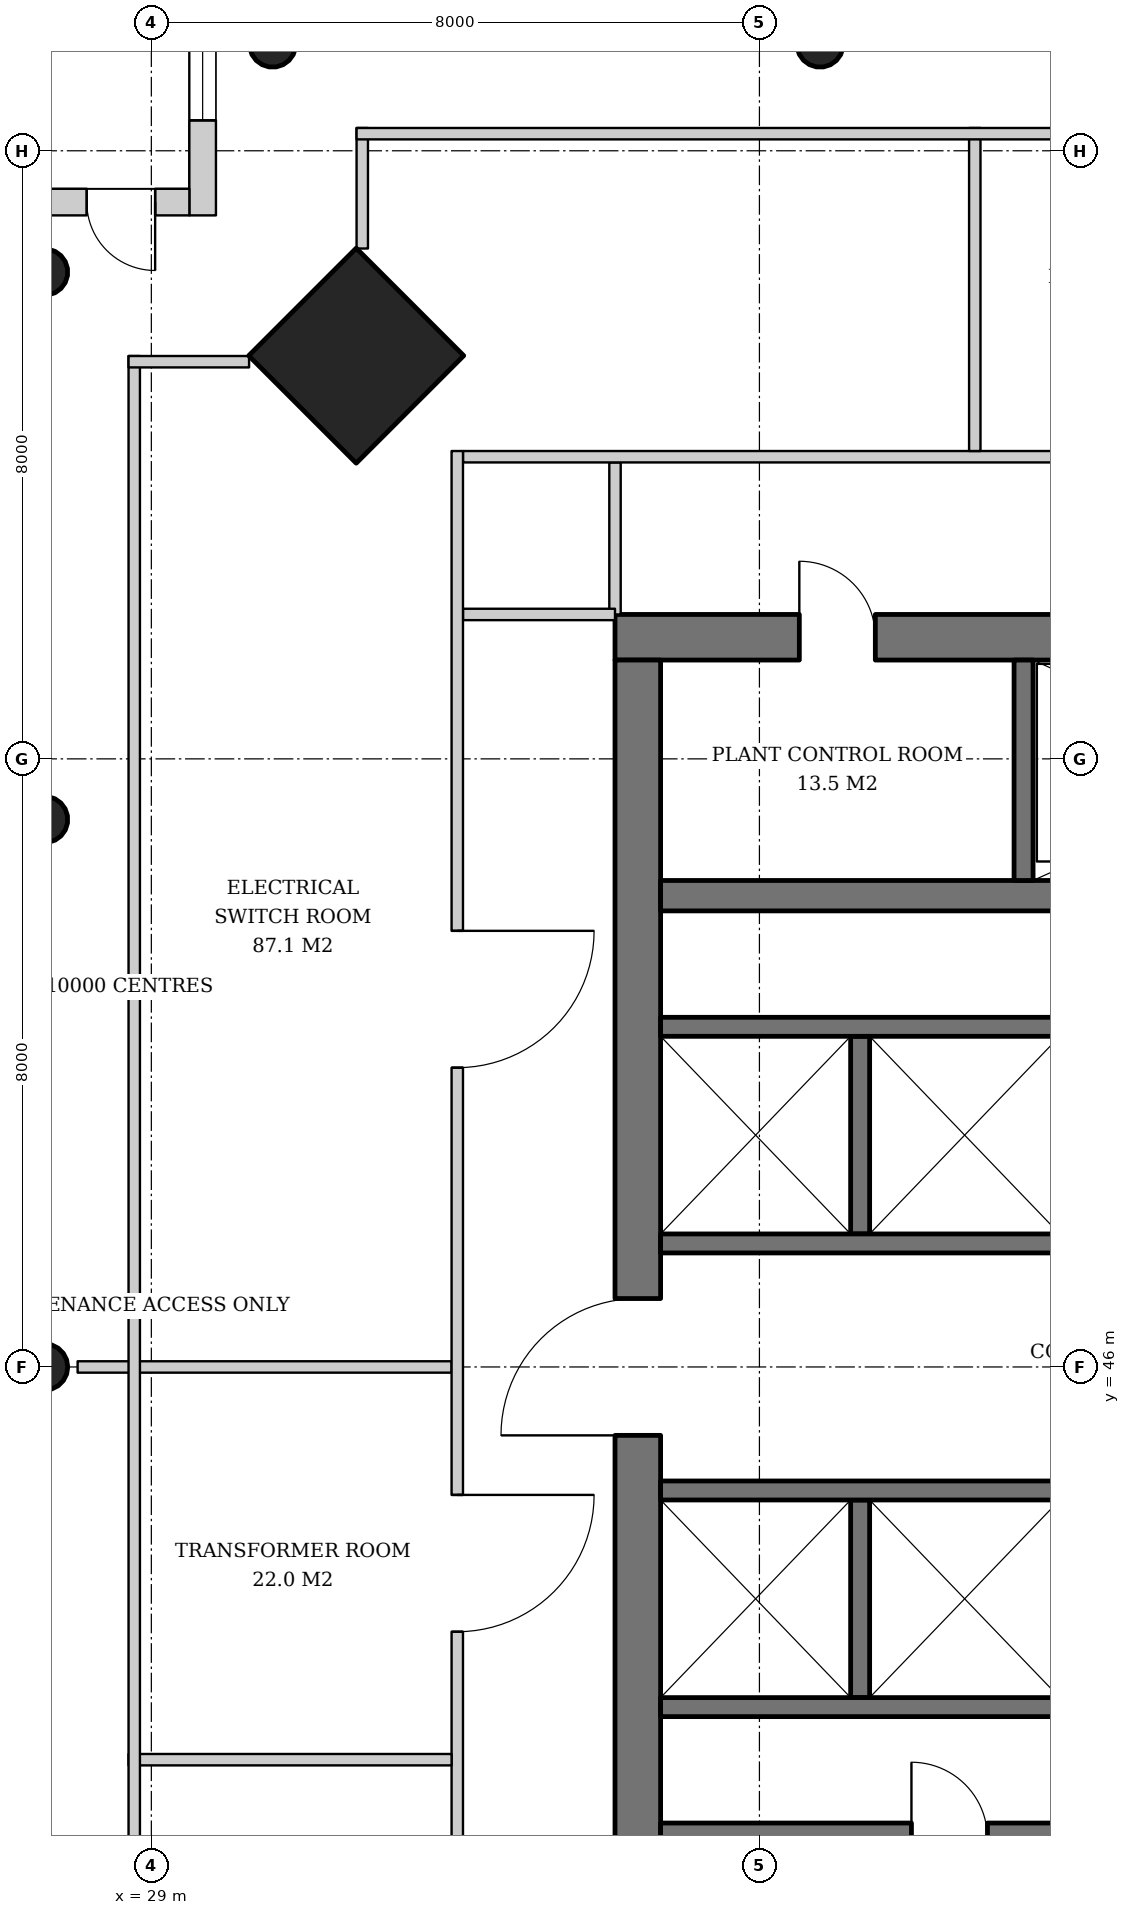
"""IFC4 building model, lengths in metres.
Left out: names, types, materials, properties, quantities, classifications, styles, units other than length and angle.
Written with IfcOpenShell. Run it as: python <this file> out.ifc"""

import sys

from ifc_helpers import new_model, si_unit, direction, frame, frame_2d, origin, origin_2d, place, context, subcontext, project, spatial, rectangle, hollow_circle, extrude, element, fill, save


model = new_model("IFC4")
c1 = context("Model", 3, precision=1e-05, world=origin(), true_north=direction((0.0, 1.0)))
c2 = subcontext(c1, "Body", "Model", "MODEL_VIEW")
j1 = project(units=[si_unit("LENGTHUNIT", "METRE"), si_unit("PLANEANGLEUNIT", "RADIAN")], contexts=[c1])
p1 = place(None, origin())
s1 = spatial("IfcSite", under=j1, at=p1, CompositionType="ELEMENT")
p2 = place(p1, origin())
s2 = spatial("IfcBuilding", under=s1, at=p2, CompositionType="ELEMENT")
p3 = place(p2, frame((0.0, 0.0, 226.2)))
s3 = spatial("IfcBuildingStorey", under=s2, at=p3, CompositionType="ELEMENT", Elevation=226.2)
p4 = place(p3, frame((31.657, 59.343, 0.0), z_axis=(0.031898107953, -0.031898107953, 0.998981992539), x_axis=(0.707106781187, 0.707106781187, 0.0)))
e1 = element("IfcColumn", 1, at=p4, inside=s3, PredefinedType="COLUMN", context=c2, shape_type="SweptSolid", body=[
    extrude(rectangle(XDim=2.0, YDim=2.0, at=origin_2d()), origin(), (0.0, 0.0, 1.0), 3.804),
])
p5 = place(p3, frame((30.557, 63.443, 0.0), z_axis=(0.031898107953, -0.031898107953, 0.998981992539), x_axis=(0.707106781187, 0.707106781187, 0.0)))
e2 = element("IfcColumn", 2, at=p5, inside=s3, PredefinedType="COLUMN", context=c2, shape_type="SweptSolid", body=[
    extrude(hollow_circle(Radius=0.305, WallThickness=0.025, at=origin_2d()), origin(), (0.0, 0.0, 1.0), 3.804),
])
p6 = place(p3, frame((37.779, 63.443, 0.0), z_axis=(0.015987237665, -0.031910269556, 0.999362868496), x_axis=(0.894067115991, 0.447933021895, 0.0)))
e3 = element("IfcColumn", 3, at=p6, inside=s3, PredefinedType="COLUMN", context=c2, shape_type="SweptSolid", body=[
    extrude(hollow_circle(Radius=0.305, WallThickness=0.025, at=origin_2d()), origin(), (0.0, 0.0, 1.0), 3.802),
])
p7 = place(p3, frame((27.557, 60.443, 0.0), z_axis=(0.031898107953, -0.031898107953, 0.998981992539), x_axis=(0.707106781187, 0.707106781187, 0.0)))
e4 = element("IfcColumn", 4, at=p7, inside=s3, PredefinedType="COLUMN", context=c2, shape_type="SweptSolid", body=[
    extrude(hollow_circle(Radius=0.305, WallThickness=0.025, at=origin_2d()), origin(), (0.0, 0.0, 1.0), 3.804),
])
p8 = place(p3, frame((27.557, 53.221, 0.0), z_axis=(0.031910269556, -0.015987237665, 0.999362868496), x_axis=(0.447933021895, 0.894067115991, 0.0)))
e5 = element("IfcColumn", 5, at=p8, inside=s3, PredefinedType="COLUMN", context=c2, shape_type="SweptSolid", body=[
    extrude(hollow_circle(Radius=0.305, WallThickness=0.025, at=origin_2d()), origin(), (0.0, 0.0, 1.0), 3.802),
])
p9 = place(p3, frame((27.557, 46.0, 0.0), z_axis=(0.031914348339, 0.0, 0.999490607445), x_axis=(0.0, 1.0, 0.0)))
e6 = element("IfcColumn", 6, at=p9, inside=s3, PredefinedType="COLUMN", context=c2, shape_type="SweptSolid", body=[
    extrude(hollow_circle(Radius=0.305, WallThickness=0.025, at=origin_2d()), origin(), (0.0, 0.0, 1.0), 3.802),
])
p10 = place(p3, frame((35.1, 55.6, 0.0), z_axis=(0.0, 0.0, 1.0), x_axis=(1.0, 0.0, 0.0)))
e7 = element("IfcWall", 7, at=p10, inside=s3, PredefinedType="SHEAR", context=c2, shape_type="SweptSolid", body=[
    extrude(rectangle(XDim=19.8, YDim=0.6, at=frame_2d((9.9, 0.0))), origin(), (0.0, 0.0, 1.0), 3.8),
])
p11 = place(p10, frame((14.54, 0.0, 0.0)))
e8 = element("IfcOpeningElement", 8, at=p11, cuts=e7, PredefinedType="OPENING", context=c2, shape_type="SweptSolid", body=[
    extrude(rectangle(XDim=1.0, YDim=2.1, at=frame_2d((0.5, 1.05))), frame((0.0, 0.31, 0.0), z_axis=(0.0, -1.0, 0.0), x_axis=(1.0, 0.0, 0.0)), (0.0, 0.0, 1.0), 0.62),
])
p12 = place(p10, frame((2.425, 0.0, 0.0)))
e9 = element("IfcOpeningElement", 9, at=p12, cuts=e7, PredefinedType="OPENING", context=c2, shape_type="SweptSolid", body=[
    extrude(rectangle(XDim=1.0, YDim=2.1, at=frame_2d((0.5, 1.05))), frame((0.0, 0.31, 0.0), z_axis=(0.0, -1.0, 0.0), x_axis=(1.0, 0.0, 0.0)), (0.0, 0.0, 1.0), 0.62),
])
p13 = place(p3, frame((35.4, 36.7, 0.0), z_axis=(0.0, 0.0, 1.0), x_axis=(0.0, 1.0, 0.0)))
e10 = element("IfcWall", 10, at=p13, inside=s3, PredefinedType="SHEAR", context=c2, shape_type="SweptSolid", body=[
    extrude(rectangle(XDim=18.6, YDim=0.6, at=frame_2d((9.3, 0.0))), origin(), (0.0, 0.0, 1.0), 3.8),
])
p14 = place(p13, frame((8.4, 0.0, 0.0)))
e11 = element("IfcOpeningElement", 11, at=p14, cuts=e10, PredefinedType="OPENING", context=c2, shape_type="SweptSolid", body=[
    extrude(rectangle(XDim=1.8, YDim=2.4, at=frame_2d((0.9, 1.2))), frame((0.0, 0.31, 0.0), z_axis=(0.0, -1.0, 0.0), x_axis=(1.0, 0.0, 0.0)), (0.0, 0.0, 1.0), 0.62),
])
p15 = place(p3, frame((35.7, 39.8, 0.0), z_axis=(0.0, 0.0, 1.0), x_axis=(1.0, 0.0, 0.0)))
e12 = element("IfcWall", 12, at=p15, inside=s3, PredefinedType="SHEAR", context=c2, shape_type="SweptSolid", body=[
    extrude(rectangle(XDim=18.6, YDim=0.4, at=frame_2d((9.3, 0.0))), origin(), (0.0, 0.0, 1.0), 3.8),
])
p16 = place(p15, frame((3.3, 0.0, 0.0)))
e13 = element("IfcOpeningElement", 13, at=p16, cuts=e12, PredefinedType="OPENING", context=c2, shape_type="SweptSolid", body=[
    extrude(rectangle(XDim=1.0, YDim=2.1, at=frame_2d((0.5, 1.05))), frame((0.0, 0.21, 0.0), z_axis=(0.0, -1.0, 0.0), x_axis=(1.0, 0.0, 0.0)), (0.0, 0.0, 1.0), 0.42),
])
p17 = place(p3, frame((35.7, 52.2, 0.0), z_axis=(0.0, 0.0, 1.0), x_axis=(1.0, 0.0, 0.0)))
e14 = element("IfcWall", 14, at=p17, inside=s3, PredefinedType="SHEAR", context=c2, shape_type="SweptSolid", body=[
    extrude(rectangle(XDim=18.6, YDim=0.4, at=frame_2d((9.3, 0.0))), origin(), (0.0, 0.0, 1.0), 3.8),
])
p18 = place(p17, frame((11.33, 0.0, 0.0)))
e15 = element("IfcOpeningElement", 15, at=p18, cuts=e14, PredefinedType="OPENING", context=c2, shape_type="SweptSolid", body=[
    extrude(rectangle(XDim=1.0, YDim=2.1, at=frame_2d((0.5, 1.05))), frame((0.0, 0.21, 0.0), z_axis=(0.0, -1.0, 0.0), x_axis=(1.0, 0.0, 0.0)), (0.0, 0.0, 1.0), 0.42),
])
p19 = place(p3, frame((29.675, 64.5, 0.0), z_axis=(0.0, 0.0, 1.0), x_axis=(0.0, -1.0, 0.0)))
e16 = element("IfcWall", 16, at=p19, inside=s3, PredefinedType="SOLIDWALL", context=c2, shape_type="SweptSolid", body=[
    extrude(rectangle(XDim=3.35, YDim=0.35, at=frame_2d((1.675, 0.0))), origin(), (0.0, 0.0, 1.0), 3.52),
])
p20 = place(p19, frame((0.9, 0.0, 0.6)))
e17 = element("IfcOpeningElement", 17, at=p20, cuts=e16, PredefinedType="OPENING", context=c2, shape_type="SweptSolid", body=[
    extrude(rectangle(XDim=1.2, YDim=2.55, at=frame_2d((0.6, 1.275))), frame((0.0, 0.185, 0.0), z_axis=(0.0, -1.0, 0.0), x_axis=(1.0, 0.0, 0.0)), (0.0, 0.0, 1.0), 0.37),
])
p21 = place(p3, frame((29.5, 61.325, 0.0), z_axis=(0.0, 0.0, 1.0), x_axis=(-1.0, 0.0, 0.0)))
e18 = element("IfcWall", 18, at=p21, inside=s3, PredefinedType="SOLIDWALL", context=c2, shape_type="SweptSolid", body=[
    extrude(rectangle(XDim=3.0, YDim=0.35, at=frame_2d((1.5, 0.0))), origin(), (0.0, 0.0, 1.0), 3.52),
])
p22 = place(p21, frame((0.45, 0.0, 0.0)))
e19 = element("IfcOpeningElement", 19, at=p22, cuts=e18, PredefinedType="OPENING", context=c2, shape_type="SweptSolid", body=[
    extrude(rectangle(XDim=0.9, YDim=2.1, at=frame_2d((0.45, 1.05))), frame((0.0, 0.185, 0.0), z_axis=(0.0, -1.0, 0.0), x_axis=(1.0, 0.0, 0.0)), (0.0, 0.0, 1.0), 0.37),
])
p23 = place(p3, frame((40.475, 52.4, 0.0), z_axis=(0.0, 0.0, 1.0), x_axis=(0.0, 1.0, 0.0)))
e20 = element("IfcWall", 20, at=p23, inside=s3, PredefinedType="SHEAR", context=c2, shape_type="SweptSolid", body=[
    extrude(rectangle(XDim=2.9, YDim=0.25, at=frame_2d((1.45, 0.0))), origin(), (0.0, 0.0, 1.0), 3.8),
])
p24 = place(p3, frame((38.325, 47.75, 0.0), z_axis=(0.0, 0.0, 1.0), x_axis=(0.0, 1.0, 0.0)))
e21 = element("IfcWall", 21, at=p24, inside=s3, PredefinedType="SHEAR", context=c2, shape_type="SweptSolid", body=[
    extrude(rectangle(XDim=2.6, YDim=0.25, at=frame_2d((1.3, 0.0))), origin(), (0.0, 0.0, 1.0), 3.8),
])
p25 = place(p3, frame((35.7, 50.475, 0.0), z_axis=(0.0, 0.0, 1.0), x_axis=(1.0, 0.0, 0.0)))
e22 = element("IfcWall", 22, at=p25, inside=s3, PredefinedType="SHEAR", context=c2, shape_type="SweptSolid", body=[
    extrude(rectangle(XDim=11.0, YDim=0.25, at=frame_2d((5.5, 0.0))), origin(), (0.0, 0.0, 1.0), 3.8),
])
p26 = place(p3, frame((35.7, 47.625, 0.0), z_axis=(0.0, 0.0, 1.0), x_axis=(1.0, 0.0, 0.0)))
e23 = element("IfcWall", 23, at=p26, inside=s3, PredefinedType="SHEAR", context=c2, shape_type="SweptSolid", body=[
    extrude(rectangle(XDim=12.83, YDim=0.25, at=frame_2d((6.415, 0.0))), origin(), (0.0, 0.0, 1.0), 3.8),
])
p27 = place(p26, frame((9.0, 0.0, 0.0)))
e24 = element("IfcOpeningElement", 24, at=p27, cuts=e23, PredefinedType="OPENING", context=c2, shape_type="SweptSolid", body=[
    extrude(rectangle(XDim=1.0, YDim=2.1, at=frame_2d((0.5, 1.05))), frame((0.0, 0.135, 0.0), z_axis=(0.0, -1.0, 0.0), x_axis=(1.0, 0.0, 0.0)), (0.0, 0.0, 1.0), 0.27),
])
p28 = place(p26, frame((11.415, 0.0, 0.0)))
e25 = element("IfcOpeningElement", 25, at=p28, cuts=e23, PredefinedType="OPENING", context=c2, shape_type="SweptSolid", body=[
    extrude(rectangle(XDim=1.0, YDim=2.1, at=frame_2d((0.5, 1.05))), frame((0.0, 0.135, 0.0), z_axis=(0.0, -1.0, 0.0), x_axis=(1.0, 0.0, 0.0)), (0.0, 0.0, 1.0), 0.27),
])
p29 = place(p3, frame((38.325, 44.25, 0.0), z_axis=(0.0, 0.0, 1.0), x_axis=(0.0, -1.0, 0.0)))
e26 = element("IfcWall", 26, at=p29, inside=s3, PredefinedType="SHEAR", context=c2, shape_type="SweptSolid", body=[
    extrude(rectangle(XDim=2.6, YDim=0.25, at=frame_2d((1.3, 0.0))), origin(), (0.0, 0.0, 1.0), 3.8),
])
p30 = place(p3, frame((35.7, 41.525, 0.0), z_axis=(0.0, 0.0, 1.0), x_axis=(1.0, 0.0, 0.0)))
e27 = element("IfcWall", 27, at=p30, inside=s3, PredefinedType="SHEAR", context=c2, shape_type="SweptSolid", body=[
    extrude(rectangle(XDim=11.0, YDim=0.25, at=frame_2d((5.5, 0.0))), origin(), (0.0, 0.0, 1.0), 3.8),
])
p31 = place(p3, frame((35.7, 44.375, 0.0), z_axis=(0.0, 0.0, 1.0), x_axis=(1.0, 0.0, 0.0)))
e28 = element("IfcWall", 28, at=p31, inside=s3, PredefinedType="SHEAR", context=c2, shape_type="SweptSolid", body=[
    extrude(rectangle(XDim=12.83, YDim=0.25, at=frame_2d((6.415, 0.0))), origin(), (0.0, 0.0, 1.0), 3.8),
])
p32 = place(p31, frame((9.0, 0.0, 0.0)))
e29 = element("IfcOpeningElement", 29, at=p32, cuts=e28, PredefinedType="OPENING", context=c2, shape_type="SweptSolid", body=[
    extrude(rectangle(XDim=1.0, YDim=2.1, at=frame_2d((0.5, 1.05))), frame((0.0, 0.135, 0.0), z_axis=(0.0, -1.0, 0.0), x_axis=(1.0, 0.0, 0.0)), (0.0, 0.0, 1.0), 0.27),
])
p33 = place(p31, frame((11.415, 0.0, 0.0)))
e30 = element("IfcOpeningElement", 30, at=p33, cuts=e28, PredefinedType="OPENING", context=c2, shape_type="SweptSolid", body=[
    extrude(rectangle(XDim=1.0, YDim=2.1, at=frame_2d((0.5, 1.05))), frame((0.0, 0.135, 0.0), z_axis=(0.0, -1.0, 0.0), x_axis=(1.0, 0.0, 0.0)), (0.0, 0.0, 1.0), 0.27),
])
p34 = place(p3, frame((35.1, 55.9, 0.0), z_axis=(0.0, 0.0, 1.0), x_axis=(0.0, 1.0, 0.0)))
e31 = element("IfcWall", 31, at=p34, inside=s3, PredefinedType="PARTITIONING", context=c2, shape_type="SweptSolid", body=[
    extrude(rectangle(XDim=2.0, YDim=0.15, at=frame_2d((1.0, 0.0))), origin(), (0.0, 0.0, 1.0), 3.52),
])
p35 = place(p3, frame((57.05, 57.975, 0.0), z_axis=(0.0, 0.0, 1.0), x_axis=(-1.0, 0.0, 0.0)))
e32 = element("IfcWall", 32, at=p35, inside=s3, PredefinedType="SOLIDWALL", context=c2, shape_type="SweptSolid", body=[
    extrude(rectangle(XDim=23.95, YDim=0.15, at=frame_2d((11.975, 0.0))), origin(), (0.0, 0.0, 1.0), 2.706),
])
p36 = place(p35, frame((2.85, 0.0, 0.0)))
e33 = element("IfcOpeningElement", 33, at=p36, cuts=e32, PredefinedType="OPENING", context=c2, shape_type="SweptSolid", body=[
    extrude(rectangle(XDim=1.0, YDim=2.1, at=frame_2d((0.5, 1.05))), frame((0.0, 0.085, 0.0), z_axis=(0.0, -1.0, 0.0), x_axis=(1.0, 0.0, 0.0)), (0.0, 0.0, 1.0), 0.17),
])
p37 = place(p35, frame((7.35, 0.0, 0.0)))
e34 = element("IfcOpeningElement", 34, at=p37, cuts=e32, PredefinedType="OPENING", context=c2, shape_type="SweptSolid", body=[
    extrude(rectangle(XDim=1.8, YDim=2.4, at=frame_2d((0.9, 1.2))), frame((0.0, 0.085, 0.0), z_axis=(0.0, -1.0, 0.0), x_axis=(1.0, 0.0, 0.0)), (0.0, 0.0, 1.0), 0.17),
])
p38 = place(p35, frame((13.733, 0.0, 0.0)))
e35 = element("IfcOpeningElement", 35, at=p38, cuts=e32, PredefinedType="OPENING", context=c2, shape_type="SweptSolid", body=[
    extrude(rectangle(XDim=1.8, YDim=2.4, at=frame_2d((0.9, 1.2))), frame((0.0, 0.085, 0.0), z_axis=(0.0, -1.0, 0.0), x_axis=(1.0, 0.0, 0.0)), (0.0, 0.0, 1.0), 0.17),
])
p39 = place(p3, frame((39.833, 58.05, 0.0), z_axis=(0.0, 0.0, 1.0), x_axis=(0.0, 1.0, 0.0)))
e36 = element("IfcWall", 36, at=p39, inside=s3, PredefinedType="SOLIDWALL", context=c2, shape_type="SweptSolid", body=[
    extrude(rectangle(XDim=4.25, YDim=0.15, at=frame_2d((2.125, 0.0))), origin(), (0.0, 0.0, 1.0), 3.52),
])
p40 = place(p3, frame((35.1, 55.9, 0.0), z_axis=(0.0, 0.0, 1.0), x_axis=(-1.0, 0.0, 0.0)))
e37 = element("IfcWall", 37, at=p40, inside=s3, PredefinedType="PARTITIONING", context=c2, shape_type="SweptSolid", body=[
    extrude(rectangle(XDim=2.0, YDim=0.15, at=frame_2d((1.0, 0.0))), origin(), (0.0, 0.0, 1.0), 3.52),
])
p41 = place(p3, frame((32.95, 46.0, 0.0), z_axis=(0.0, 0.0, 1.0), x_axis=(-1.0, 0.0, 0.0)))
e38 = element("IfcWall", 38, at=p41, inside=s3, PredefinedType="SOLIDWALL", context=c2, shape_type="SweptSolid", body=[
    extrude(rectangle(XDim=4.92, YDim=0.15, at=frame_2d((2.46, 0.0))), origin(), (0.0, 0.0, 1.0), 3.52),
])
p42 = place(p3, frame((33.025, 58.05, 0.0), z_axis=(0.0, 0.0, 1.0), x_axis=(0.0, -1.0, 0.0)))
e39 = element("IfcWall", 39, at=p42, inside=s3, PredefinedType="SOLIDWALL", context=c2, shape_type="SweptSolid", body=[
    extrude(rectangle(XDim=23.95, YDim=0.15, at=frame_2d((11.975, 0.0))), origin(), (0.0, 0.0, 1.0), 2.706),
])
p43 = place(p42, frame((6.312, 0.0, 0.0)))
e40 = element("IfcOpeningElement", 40, at=p43, cuts=e39, PredefinedType="OPENING", context=c2, shape_type="SweptSolid", body=[
    extrude(rectangle(XDim=1.8, YDim=2.4, at=frame_2d((0.9, 1.2))), frame((0.0, 0.085, 0.0), z_axis=(0.0, -1.0, 0.0), x_axis=(1.0, 0.0, 0.0)), (0.0, 0.0, 1.0), 0.17),
])
p44 = place(p42, frame((13.733, 0.0, 0.0)))
e41 = element("IfcOpeningElement", 41, at=p44, cuts=e39, PredefinedType="OPENING", context=c2, shape_type="SweptSolid", body=[
    extrude(rectangle(XDim=1.8, YDim=2.4, at=frame_2d((0.9, 1.2))), frame((0.0, 0.085, 0.0), z_axis=(0.0, -1.0, 0.0), x_axis=(1.0, 0.0, 0.0)), (0.0, 0.0, 1.0), 0.17),
])
p45 = place(p3, frame((32.95, 40.833, 0.0), z_axis=(0.0, 0.0, 1.0), x_axis=(-1.0, 0.0, 0.0)))
e42 = element("IfcWall", 42, at=p45, inside=s3, PredefinedType="SOLIDWALL", context=c2, shape_type="SweptSolid", body=[
    extrude(rectangle(XDim=4.25, YDim=0.15, at=frame_2d((2.125, 0.0))), origin(), (0.0, 0.0, 1.0), 3.52),
])
p46 = place(p3, frame((28.775, 32.7, 0.0), z_axis=(0.0, 0.0, 1.0), x_axis=(0.0, 1.0, 0.0)))
e43 = element("IfcWall", 43, at=p46, inside=s3, PredefinedType="PARTITIONING", context=c2, shape_type="SweptSolid", body=[
    extrude(rectangle(XDim=26.6, YDim=0.15, at=frame_2d((13.3, 0.0))), origin(), (0.0, 0.0, 1.0), 2.706),
])
for number, where, z_axis, x_axis in (
    (44, (28.7, 59.225, 0.0), (0.0, 0.0, 1.0), (1.0, 0.0, 0.0)),
    (45, (31.775, 60.714, 0.0), (0.0, 0.0, 1.0), (0.0, 1.0, 0.0)),
):
    element("IfcWall", number, at=place(p3, frame(where, z_axis=z_axis, x_axis=x_axis)), inside=s3, PredefinedType="PARTITIONING", context=c2, shape_type="SweptSolid", body=[
        extrude(rectangle(XDim=1.586, YDim=0.15, at=frame_2d((0.793, 0.0))), origin(), (0.0, 0.0, 1.0), 3.52),
    ])
p47 = place(p3, frame((31.7, 62.225, 0.0), z_axis=(0.0, 0.0, 1.0), x_axis=(1.0, 0.0, 0.0)))
e46 = element("IfcWall", 46, at=p47, inside=s3, PredefinedType="PARTITIONING", context=c2, shape_type="SweptSolid", body=[
    extrude(rectangle(XDim=26.6, YDim=0.15, at=frame_2d((13.3, 0.0))), origin(), (0.0, 0.0, 1.0), 2.706),
])
p48 = place(p20, origin())
e47 = element("IfcWindow", 47, at=p48, inside=s3, PartitioningType="SINGLE_PANEL", PredefinedType="USERDEFINED", context=c2, shape_type="SweptSolid", body=[
    extrude(rectangle(XDim=1.2, YDim=2.55, at=frame_2d((0.6, 1.275))), frame((0.0, 0.03, 0.0), z_axis=(0.0, -1.0, 0.0), x_axis=(1.0, 0.0, 0.0)), (0.0, 0.0, 1.0), 0.06),
])
fill(e17, e47)
p49 = place(p22, origin())
e48 = element("IfcDoor", 48, at=p49, inside=s3, OperationType="SINGLE_SWING_LEFT", PredefinedType="DOOR", context=c2, shape_type="SweptSolid", body=[
    extrude(rectangle(XDim=0.9, YDim=2.1, at=frame_2d((0.45, 1.05))), frame((0.0, 0.025, 0.0), z_axis=(0.0, -1.0, 0.0), x_axis=(1.0, 0.0, 0.0)), (0.0, 0.0, 1.0), 0.05),
])
fill(e19, e48)
p50 = place(p14, origin())
e49 = element("IfcDoor", 49, at=p50, inside=s3, OperationType="DOUBLE_DOOR_SINGLE_SWING", PredefinedType="DOOR", context=c2, shape_type="SweptSolid", body=[
    extrude(rectangle(XDim=1.8, YDim=2.4, at=frame_2d((0.9, 1.2))), frame((0.0, 0.025, 0.0), z_axis=(0.0, -1.0, 0.0), x_axis=(1.0, 0.0, 0.0)), (0.0, 0.0, 1.0), 0.05),
])
fill(e11, e49)
p51 = place(p12, origin())
e50 = element("IfcDoor", 50, at=p51, inside=s3, OperationType="SINGLE_SWING_LEFT", PredefinedType="DOOR", context=c2, shape_type="SweptSolid", body=[
    extrude(rectangle(XDim=1.0, YDim=2.1, at=frame_2d((0.5, 1.05))), frame((0.0, -0.24, 0.0), z_axis=(0.0, -1.0, 0.0), x_axis=(1.0, 0.0, 0.0)), (0.0, 0.0, 1.0), 0.05),
])
fill(e9, e50)
p52 = place(p43, origin())
e51 = element("IfcDoor", 51, at=p52, inside=s3, OperationType="DOUBLE_DOOR_SINGLE_SWING", PredefinedType="DOOR", context=c2, shape_type="SweptSolid", body=[
    extrude(rectangle(XDim=1.8, YDim=2.4, at=frame_2d((0.9, 1.2))), frame((0.0, 0.025, 0.0), z_axis=(0.0, -1.0, 0.0), x_axis=(1.0, 0.0, 0.0)), (0.0, 0.0, 1.0), 0.05),
])
fill(e40, e51)
p53 = place(p44, origin())
e52 = element("IfcDoor", 52, at=p53, inside=s3, OperationType="DOUBLE_DOOR_SINGLE_SWING", PredefinedType="DOOR", context=c2, shape_type="SweptSolid", body=[
    extrude(rectangle(XDim=1.8, YDim=2.4, at=frame_2d((0.9, 1.2))), frame((0.0, 0.025, 0.0), z_axis=(0.0, -1.0, 0.0), x_axis=(1.0, 0.0, 0.0)), (0.0, 0.0, 1.0), 0.05),
])
fill(e41, e52)
save(model, sys.argv[1])
